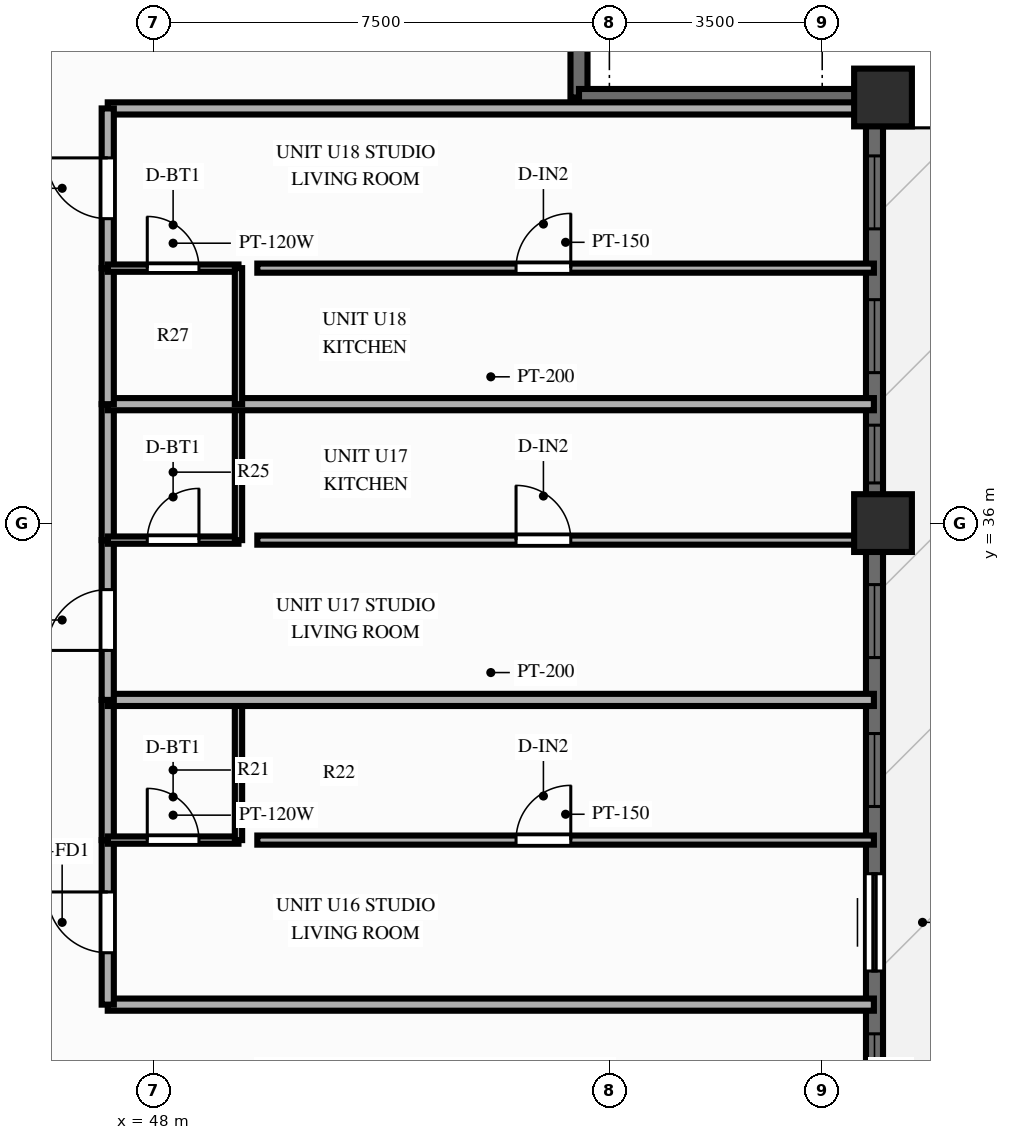
"""IFC4 building model, lengths in metres.
Left out: names, types, materials, properties, quantities, classifications, styles, units other than length and angle.
Written with IfcOpenShell. Run it as: python <this file> out.ifc"""

import sys

from ifc_helpers import new_model, si_unit, direction, frame, frame_2d, origin, origin_2d, place, context, subcontext, project, spatial, rectangle, extrude, source, transform, mapped, element, fill, save


model = new_model("IFC4")
c1 = context("Model", 3, precision=1e-05, world=origin(), true_north=direction((0.0, 1.0)))
c2 = subcontext(c1, "Body", "Model", "MODEL_VIEW")
j1 = project(units=[si_unit("LENGTHUNIT", "METRE"), si_unit("PLANEANGLEUNIT", "RADIAN")], contexts=[c1])
p1 = place(None, origin())
s1 = spatial("IfcSite", under=j1, at=p1, CompositionType="ELEMENT")
p2 = place(p1, origin())
s2 = spatial("IfcBuilding", under=s1, at=p2, CompositionType="ELEMENT")
p3 = place(p2, frame((0.0, 0.0, 163.0)))
s3 = spatial("IfcBuildingStorey", under=s2, at=p3, CompositionType="ELEMENT", Elevation=163.0)
m1 = source(origin(), c2, "Body", "SweptSolid", [
    extrude(rectangle(XDim=0.95, YDim=0.95, at=origin_2d()), origin(), (0.0, 0.0, 1.0), 3.0),
])
for number, where, z_axis, x_axis in (
    (1, (60.0, 36.0, 0.0), (0.0, 0.0, 1.0), (1.0, 0.0, 0.0)),
    (2, (60.0, 43.0, 0.0), (0.0, 0.0, 1.0), (1.0, 0.0, 0.0)),
):
    element("IfcColumn", number, at=place(p3, frame(where, z_axis=z_axis, x_axis=x_axis)), inside=s3, PredefinedType="COLUMN", context=c2, shape_type="MappedRepresentation", body=[
        mapped(m1, transform((0.0, 0.0, 0.0), scale=1.0)),
    ])
p4 = place(p3, frame((59.86, 11.0, 0.0), z_axis=(0.0, 0.0, 1.0), x_axis=(0.0, 1.0, 0.0)))
e3 = element("IfcWall", 3, at=p4, inside=s3, PredefinedType="SOLIDWALL", context=c2, shape_type="SweptSolid", body=[
    extrude(rectangle(XDim=32.0, YDim=0.28, at=frame_2d((16.0, 0.0))), origin(), (0.0, 0.0, 1.0), 2.28),
])
p5 = place(p4, frame((1.04, 0.0, 0.25)))
e4 = element("IfcOpeningElement", 4, at=p5, cuts=e3, PredefinedType="OPENING", context=c2, shape_type="SweptSolid", body=[
    extrude(rectangle(XDim=1.2, YDim=1.5, at=frame_2d((0.6, 0.75))), frame((0.0, 0.152, 0.0), z_axis=(0.0, -1.0, 0.0), x_axis=(1.0, 0.0, 0.0)), (0.0, 0.0, 1.0), 0.304),
])
p6 = place(p4, frame((3.552, 0.0, 0.25)))
e5 = element("IfcOpeningElement", 5, at=p6, cuts=e3, PredefinedType="OPENING", context=c2, shape_type="SweptSolid", body=[
    extrude(rectangle(XDim=1.2, YDim=1.5, at=frame_2d((0.6, 0.75))), frame((0.0, 0.152, 0.0), z_axis=(0.0, -1.0, 0.0), x_axis=(1.0, 0.0, 0.0)), (0.0, 0.0, 1.0), 0.304),
])
p7 = place(p4, frame((5.662, 0.0, 0.25)))
e6 = element("IfcOpeningElement", 6, at=p7, cuts=e3, PredefinedType="OPENING", context=c2, shape_type="SweptSolid", body=[
    extrude(rectangle(XDim=0.7, YDim=1.5, at=frame_2d((0.35, 0.75))), frame((0.0, 0.152, 0.0), z_axis=(0.0, -1.0, 0.0), x_axis=(1.0, 0.0, 0.0)), (0.0, 0.0, 1.0), 0.304),
])
p8 = place(p4, frame((8.29, 0.0, 0.25)))
e7 = element("IfcOpeningElement", 7, at=p8, cuts=e3, PredefinedType="OPENING", context=c2, shape_type="SweptSolid", body=[
    extrude(rectangle(XDim=1.2, YDim=1.5, at=frame_2d((0.6, 0.75))), frame((0.0, 0.152, 0.0), z_axis=(0.0, -1.0, 0.0), x_axis=(1.0, 0.0, 0.0)), (0.0, 0.0, 1.0), 0.304),
])
p9 = place(p4, frame((10.688, 0.0, 0.25)))
e8 = element("IfcOpeningElement", 8, at=p9, cuts=e3, PredefinedType="OPENING", context=c2, shape_type="SweptSolid", body=[
    extrude(rectangle(XDim=1.2, YDim=1.5, at=frame_2d((0.6, 0.75))), frame((0.0, 0.152, 0.0), z_axis=(0.0, -1.0, 0.0), x_axis=(1.0, 0.0, 0.0)), (0.0, 0.0, 1.0), 0.304),
])
p10 = place(p4, frame((13.046, 0.0, 0.25)))
e9 = element("IfcOpeningElement", 9, at=p10, cuts=e3, PredefinedType="OPENING", context=c2, shape_type="SweptSolid", body=[
    extrude(rectangle(XDim=1.2, YDim=1.5, at=frame_2d((0.6, 0.75))), frame((0.0, 0.152, 0.0), z_axis=(0.0, -1.0, 0.0), x_axis=(1.0, 0.0, 0.0)), (0.0, 0.0, 1.0), 0.304),
])
p11 = place(p4, frame((15.4, 0.0, 0.25)))
e10 = element("IfcOpeningElement", 10, at=p11, cuts=e3, PredefinedType="OPENING", context=c2, shape_type="SweptSolid", body=[
    extrude(rectangle(XDim=1.2, YDim=1.5, at=frame_2d((0.6, 0.75))), frame((0.0, 0.152, 0.0), z_axis=(0.0, -1.0, 0.0), x_axis=(1.0, 0.0, 0.0)), (0.0, 0.0, 1.0), 0.304),
])
p12 = place(p4, frame((19.233, 0.0, 0.0), z_axis=(0.0, 0.0, 1.0), x_axis=(-1.0, 0.0, 0.0)))
e11 = element("IfcOpeningElement", 11, at=p12, cuts=e3, PredefinedType="OPENING", context=c2, shape_type="SweptSolid", body=[
    extrude(rectangle(XDim=1.6, YDim=2.15, at=frame_2d((0.8, 1.075))), frame((0.0, 0.152, 0.0), z_axis=(0.0, -1.0, 0.0), x_axis=(1.0, 0.0, 0.0)), (0.0, 0.0, 1.0), 0.304),
])
p13 = place(p4, frame((20.339, 0.0, 0.25)))
e12 = element("IfcOpeningElement", 12, at=p13, cuts=e3, PredefinedType="OPENING", context=c2, shape_type="SweptSolid", body=[
    extrude(rectangle(XDim=1.2, YDim=1.5, at=frame_2d((0.6, 0.75))), frame((0.0, 0.152, 0.0), z_axis=(0.0, -1.0, 0.0), x_axis=(1.0, 0.0, 0.0)), (0.0, 0.0, 1.0), 0.304),
])
p14 = place(p4, frame((22.788, 0.0, 0.25)))
e13 = element("IfcOpeningElement", 13, at=p14, cuts=e3, PredefinedType="OPENING", context=c2, shape_type="SweptSolid", body=[
    extrude(rectangle(XDim=1.2, YDim=1.5, at=frame_2d((0.6, 0.75))), frame((0.0, 0.152, 0.0), z_axis=(0.0, -1.0, 0.0), x_axis=(1.0, 0.0, 0.0)), (0.0, 0.0, 1.0), 0.304),
])
p15 = place(p4, frame((25.66, 0.0, 0.25)))
e14 = element("IfcOpeningElement", 14, at=p15, cuts=e3, PredefinedType="OPENING", context=c2, shape_type="SweptSolid", body=[
    extrude(rectangle(XDim=0.95, YDim=1.5, at=frame_2d((0.475, 0.75))), frame((0.0, 0.152, 0.0), z_axis=(0.0, -1.0, 0.0), x_axis=(1.0, 0.0, 0.0)), (0.0, 0.0, 1.0), 0.304),
])
p16 = place(p4, frame((27.475, 0.0, 0.25)))
e15 = element("IfcOpeningElement", 15, at=p16, cuts=e3, PredefinedType="OPENING", context=c2, shape_type="SweptSolid", body=[
    extrude(rectangle(XDim=1.2, YDim=1.5, at=frame_2d((0.6, 0.75))), frame((0.0, 0.152, 0.0), z_axis=(0.0, -1.0, 0.0), x_axis=(1.0, 0.0, 0.0)), (0.0, 0.0, 1.0), 0.304),
])
p17 = place(p4, frame((29.839, 0.0, 0.25)))
e16 = element("IfcOpeningElement", 16, at=p17, cuts=e3, PredefinedType="OPENING", context=c2, shape_type="SweptSolid", body=[
    extrude(rectangle(XDim=1.2, YDim=1.5, at=frame_2d((0.6, 0.75))), frame((0.0, 0.152, 0.0), z_axis=(0.0, -1.0, 0.0), x_axis=(1.0, 0.0, 0.0)), (0.0, 0.0, 1.0), 0.304),
])
for number, where, z_axis, x_axis in (
    (17, (55.0, 43.0, 0.0), (0.0, 0.0, 1.0), (0.0, 1.0, 0.0)),
    (18, (55.0, 43.0, 0.0), (0.0, 0.0, 1.0), (1.0, 0.0, 0.0)),
):
    element("IfcWall", number, at=place(p3, frame(where, z_axis=z_axis, x_axis=x_axis)), inside=s3, PredefinedType="SOLIDWALL", context=c2, shape_type="SweptSolid", body=[
        extrude(rectangle(XDim=4.92, YDim=0.28, at=frame_2d((2.46, 0.0))), origin(), (0.0, 0.0, 1.0), 2.28),
    ])
for number, where, z_axis, x_axis in (
    (19, (47.25, 28.08, 0.0), (0.0, 0.0, 1.0), (1.0, 0.0, 0.0)),
    (20, (47.25, 42.82, 0.0), (0.0, 0.0, 1.0), (1.0, 0.0, 0.0)),
):
    element("IfcWall", number, at=place(p3, frame(where, z_axis=z_axis, x_axis=x_axis)), inside=s3, PredefinedType="PARTITIONING", context=c2, shape_type="SweptSolid", body=[
        extrude(rectangle(XDim=12.6, YDim=0.2, at=frame_2d((6.3, 0.0))), origin(), (0.0, 0.0, 1.0), 2.79),
    ])
p18 = place(p3, frame((47.25, 28.08, 0.0), z_axis=(0.0, 0.0, 1.0), x_axis=(0.0, 1.0, 0.0)))
e21 = element("IfcWall", 21, at=p18, inside=s3, PredefinedType="PARTITIONING", context=c2, shape_type="SweptSolid", body=[
    extrude(rectangle(XDim=2.706, YDim=0.2, at=frame_2d((1.353, 0.0))), origin(), (0.0, 0.0, 1.0), 2.79),
])
p19 = place(p18, frame((0.853, 0.0, 0.0)))
e22 = element("IfcOpeningElement", 22, at=p19, cuts=e21, PredefinedType="OPENING", context=c2, shape_type="SweptSolid", body=[
    extrude(rectangle(XDim=1.0, YDim=2.15, at=frame_2d((0.5, 1.075))), frame((0.0, 0.112, 0.0), z_axis=(0.0, -1.0, 0.0), x_axis=(1.0, 0.0, 0.0)), (0.0, 0.0, 1.0), 0.224),
])
p20 = place(p3, frame((47.25, 30.786, 0.0), z_axis=(0.0, 0.0, 1.0), x_axis=(0.0, 1.0, 0.0)))
e23 = element("IfcWall", 23, at=p20, inside=s3, PredefinedType="PARTITIONING", context=c2, shape_type="SweptSolid", body=[
    extrude(rectangle(XDim=2.305, YDim=0.2, at=frame_2d((1.153, 0.0))), origin(), (0.0, 0.0, 1.0), 2.79),
])
p21 = place(p3, frame((47.25, 30.786, 0.0), z_axis=(0.0, 0.0, 1.0), x_axis=(1.0, 0.0, 0.0)))
e24 = element("IfcWall", 24, at=p21, inside=s3, PredefinedType="PARTITIONING", context=c2, shape_type="SweptSolid", body=[
    extrude(rectangle(XDim=2.15, YDim=0.12, at=frame_2d((1.075, 0.0))), origin(), (0.0, 0.0, 1.0), 2.79),
])
p22 = place(p21, frame((0.65, 0.0, 0.0)))
e25 = element("IfcOpeningElement", 25, at=p22, cuts=e24, PredefinedType="OPENING", context=c2, shape_type="SweptSolid", body=[
    extrude(rectangle(XDim=0.85, YDim=2.05, at=frame_2d((0.425, 1.025))), frame((0.0, 0.072, 0.0), z_axis=(0.0, -1.0, 0.0), x_axis=(1.0, 0.0, 0.0)), (0.0, 0.0, 1.0), 0.144),
])
p23 = place(p3, frame((49.4, 30.786, 0.0), z_axis=(0.0, 0.0, 1.0), x_axis=(0.0, 1.0, 0.0)))
e26 = element("IfcWall", 26, at=p23, inside=s3, PredefinedType="PARTITIONING", context=c2, shape_type="SweptSolid", body=[
    extrude(rectangle(XDim=2.305, YDim=0.12, at=frame_2d((1.153, 0.0))), origin(), (0.0, 0.0, 1.0), 2.79),
])
p24 = place(p3, frame((49.71, 30.786, 0.0), z_axis=(0.0, 0.0, 1.0), x_axis=(1.0, 0.0, 0.0)))
e27 = element("IfcWall", 27, at=p24, inside=s3, PredefinedType="PARTITIONING", context=c2, shape_type="SweptSolid", body=[
    extrude(rectangle(XDim=10.14, YDim=0.15, at=frame_2d((5.07, 0.0))), origin(), (0.0, 0.0, 1.0), 2.79),
])
p25 = place(p24, frame((4.255, 0.0, 0.0)))
e28 = element("IfcOpeningElement", 28, at=p25, cuts=e27, PredefinedType="OPENING", context=c2, shape_type="SweptSolid", body=[
    extrude(rectangle(XDim=0.9, YDim=2.1, at=frame_2d((0.45, 1.05))), frame((0.0, 0.087, 0.0), z_axis=(0.0, -1.0, 0.0), x_axis=(1.0, 0.0, 0.0)), (0.0, 0.0, 1.0), 0.174),
])
p26 = place(p3, frame((47.25, 33.092, 0.0), z_axis=(0.0, 0.0, 1.0), x_axis=(1.0, 0.0, 0.0)))
e29 = element("IfcWall", 29, at=p26, inside=s3, PredefinedType="PARTITIONING", context=c2, shape_type="SweptSolid", body=[
    extrude(rectangle(XDim=12.6, YDim=0.2, at=frame_2d((6.3, 0.0))), origin(), (0.0, 0.0, 1.0), 2.79),
])
p27 = place(p3, frame((47.25, 33.092, 0.0), z_axis=(0.0, 0.0, 1.0), x_axis=(0.0, 1.0, 0.0)))
e30 = element("IfcWall", 30, at=p27, inside=s3, PredefinedType="PARTITIONING", context=c2, shape_type="SweptSolid", body=[
    extrude(rectangle(XDim=2.628, YDim=0.2, at=frame_2d((1.314, 0.0))), origin(), (0.0, 0.0, 1.0), 2.79),
])
p28 = place(p27, frame((0.814, 0.0, 0.0)))
e31 = element("IfcOpeningElement", 31, at=p28, cuts=e30, PredefinedType="OPENING", context=c2, shape_type="SweptSolid", body=[
    extrude(rectangle(XDim=1.0, YDim=2.15, at=frame_2d((0.5, 1.075))), frame((0.0, 0.112, 0.0), z_axis=(0.0, -1.0, 0.0), x_axis=(1.0, 0.0, 0.0)), (0.0, 0.0, 1.0), 0.224),
])
p29 = place(p3, frame((47.25, 35.72, 0.0), z_axis=(0.0, 0.0, 1.0), x_axis=(0.0, 1.0, 0.0)))
e32 = element("IfcWall", 32, at=p29, inside=s3, PredefinedType="PARTITIONING", context=c2, shape_type="SweptSolid", body=[
    extrude(rectangle(XDim=2.236, YDim=0.2, at=frame_2d((1.118, 0.0))), origin(), (0.0, 0.0, 1.0), 2.79),
])
p30 = place(p3, frame((47.25, 35.72, 0.0), z_axis=(0.0, 0.0, 1.0), x_axis=(1.0, 0.0, 0.0)))
e33 = element("IfcWall", 33, at=p30, inside=s3, PredefinedType="PARTITIONING", context=c2, shape_type="SweptSolid", body=[
    extrude(rectangle(XDim=2.15, YDim=0.12, at=frame_2d((1.075, 0.0))), origin(), (0.0, 0.0, 1.0), 2.79),
])
p31 = place(p30, frame((0.65, 0.0, 0.0)))
e34 = element("IfcOpeningElement", 34, at=p31, cuts=e33, PredefinedType="OPENING", context=c2, shape_type="SweptSolid", body=[
    extrude(rectangle(XDim=0.85, YDim=2.05, at=frame_2d((0.425, 1.025))), frame((0.0, 0.072, 0.0), z_axis=(0.0, -1.0, 0.0), x_axis=(1.0, 0.0, 0.0)), (0.0, 0.0, 1.0), 0.144),
])
p32 = place(p3, frame((49.4, 35.72, 0.0), z_axis=(0.0, 0.0, 1.0), x_axis=(0.0, 1.0, 0.0)))
e35 = element("IfcWall", 35, at=p32, inside=s3, PredefinedType="PARTITIONING", context=c2, shape_type="SweptSolid", body=[
    extrude(rectangle(XDim=2.236, YDim=0.12, at=frame_2d((1.118, 0.0))), origin(), (0.0, 0.0, 1.0), 2.79),
])
p33 = place(p3, frame((49.71, 35.72, 0.0), z_axis=(0.0, 0.0, 1.0), x_axis=(1.0, 0.0, 0.0)))
e36 = element("IfcWall", 36, at=p33, inside=s3, PredefinedType="PARTITIONING", context=c2, shape_type="SweptSolid", body=[
    extrude(rectangle(XDim=10.14, YDim=0.15, at=frame_2d((5.07, 0.0))), origin(), (0.0, 0.0, 1.0), 2.79),
])
p34 = place(p33, frame((4.255, 0.0, 0.0)))
e37 = element("IfcOpeningElement", 37, at=p34, cuts=e36, PredefinedType="OPENING", context=c2, shape_type="SweptSolid", body=[
    extrude(rectangle(XDim=0.9, YDim=2.1, at=frame_2d((0.45, 1.05))), frame((0.0, 0.087, 0.0), z_axis=(0.0, -1.0, 0.0), x_axis=(1.0, 0.0, 0.0)), (0.0, 0.0, 1.0), 0.174),
])
p35 = place(p3, frame((47.25, 37.956, 0.0), z_axis=(0.0, 0.0, 1.0), x_axis=(1.0, 0.0, 0.0)))
e38 = element("IfcWall", 38, at=p35, inside=s3, PredefinedType="PARTITIONING", context=c2, shape_type="SweptSolid", body=[
    extrude(rectangle(XDim=12.6, YDim=0.2, at=frame_2d((6.3, 0.0))), origin(), (0.0, 0.0, 1.0), 2.79),
])
p36 = place(p3, frame((47.25, 37.956, 0.0), z_axis=(0.0, 0.0, 1.0), x_axis=(0.0, 1.0, 0.0)))
e39 = element("IfcWall", 39, at=p36, inside=s3, PredefinedType="PARTITIONING", context=c2, shape_type="SweptSolid", body=[
    extrude(rectangle(XDim=2.238, YDim=0.2, at=frame_2d((1.119, 0.0))), origin(), (0.0, 0.0, 1.0), 2.79),
])
p37 = place(p3, frame((47.25, 40.193, 0.0), z_axis=(0.0, 0.0, 1.0), x_axis=(0.0, 1.0, 0.0)))
e40 = element("IfcWall", 40, at=p37, inside=s3, PredefinedType="PARTITIONING", context=c2, shape_type="SweptSolid", body=[
    extrude(rectangle(XDim=2.627, YDim=0.2, at=frame_2d((1.313, 0.0))), origin(), (0.0, 0.0, 1.0), 2.79),
])
p38 = place(p37, frame((0.813, 0.0, 0.0)))
e41 = element("IfcOpeningElement", 41, at=p38, cuts=e40, PredefinedType="OPENING", context=c2, shape_type="SweptSolid", body=[
    extrude(rectangle(XDim=1.0, YDim=2.15, at=frame_2d((0.5, 1.075))), frame((0.0, 0.112, 0.0), z_axis=(0.0, -1.0, 0.0), x_axis=(1.0, 0.0, 0.0)), (0.0, 0.0, 1.0), 0.224),
])
p39 = place(p3, frame((47.25, 40.193, 0.0), z_axis=(0.0, 0.0, 1.0), x_axis=(1.0, 0.0, 0.0)))
e42 = element("IfcWall", 42, at=p39, inside=s3, PredefinedType="PARTITIONING", context=c2, shape_type="SweptSolid", body=[
    extrude(rectangle(XDim=2.15, YDim=0.12, at=frame_2d((1.075, 0.0))), origin(), (0.0, 0.0, 1.0), 2.79),
])
p40 = place(p39, frame((0.65, 0.0, 0.0)))
e43 = element("IfcOpeningElement", 43, at=p40, cuts=e42, PredefinedType="OPENING", context=c2, shape_type="SweptSolid", body=[
    extrude(rectangle(XDim=0.85, YDim=2.05, at=frame_2d((0.425, 1.025))), frame((0.0, 0.072, 0.0), z_axis=(0.0, -1.0, 0.0), x_axis=(1.0, 0.0, 0.0)), (0.0, 0.0, 1.0), 0.144),
])
p41 = place(p3, frame((49.4, 37.956, 0.0), z_axis=(0.0, 0.0, 1.0), x_axis=(0.0, 1.0, 0.0)))
e44 = element("IfcWall", 44, at=p41, inside=s3, PredefinedType="PARTITIONING", context=c2, shape_type="SweptSolid", body=[
    extrude(rectangle(XDim=2.238, YDim=0.12, at=frame_2d((1.119, 0.0))), origin(), (0.0, 0.0, 1.0), 2.79),
])
p42 = place(p3, frame((49.71, 40.193, 0.0), z_axis=(0.0, 0.0, 1.0), x_axis=(1.0, 0.0, 0.0)))
e45 = element("IfcWall", 45, at=p42, inside=s3, PredefinedType="PARTITIONING", context=c2, shape_type="SweptSolid", body=[
    extrude(rectangle(XDim=10.14, YDim=0.15, at=frame_2d((5.07, 0.0))), origin(), (0.0, 0.0, 1.0), 2.79),
])
p43 = place(p42, frame((4.255, 0.0, 0.0)))
e46 = element("IfcOpeningElement", 46, at=p43, cuts=e45, PredefinedType="OPENING", context=c2, shape_type="SweptSolid", body=[
    extrude(rectangle(XDim=0.9, YDim=2.1, at=frame_2d((0.45, 1.05))), frame((0.0, 0.087, 0.0), z_axis=(0.0, -1.0, 0.0), x_axis=(1.0, 0.0, 0.0)), (0.0, 0.0, 1.0), 0.174),
])
m2 = source(origin(), c2, "Body", "SweptSolid", [
    extrude(rectangle(XDim=1.2, YDim=1.5, at=frame_2d((0.6, 0.75))), frame((0.0, 0.03, 0.0), z_axis=(0.0, -1.0, 0.0), x_axis=(1.0, 0.0, 0.0)), (0.0, 0.0, 1.0), 0.06),
])
p44 = place(p11, origin())
e47 = element("IfcWindow", 47, at=p44, inside=s3, PartitioningType="SINGLE_PANEL", PredefinedType="WINDOW", context=c2, shape_type="MappedRepresentation", body=[
    mapped(m2, transform((0.0, 0.0, 0.0), scale=1.0)),
])
fill(e10, e47)
m3 = source(origin(), c2, "Body", "SweptSolid", [
    extrude(rectangle(XDim=1.6, YDim=2.15, at=frame_2d((0.8, 1.075))), frame((0.0, 0.025, 0.0), z_axis=(0.0, -1.0, 0.0), x_axis=(1.0, 0.0, 0.0)), (0.0, 0.0, 1.0), 0.05),
])
p45 = place(p12, origin())
e48 = element("IfcDoor", 48, at=p45, inside=s3, OperationType="SLIDING_TO_LEFT", PredefinedType="DOOR", context=c2, shape_type="MappedRepresentation", body=[
    mapped(m3, transform((0.0, 0.0, 0.0), scale=1.0)),
])
fill(e11, e48)
p46 = place(p13, origin())
e49 = element("IfcWindow", 49, at=p46, inside=s3, PartitioningType="SINGLE_PANEL", PredefinedType="WINDOW", context=c2, shape_type="MappedRepresentation", body=[
    mapped(m2, transform((0.0, 0.0, 0.0), scale=1.0)),
])
fill(e12, e49)
p47 = place(p14, origin())
e50 = element("IfcWindow", 50, at=p47, inside=s3, PartitioningType="SINGLE_PANEL", PredefinedType="WINDOW", context=c2, shape_type="MappedRepresentation", body=[
    mapped(m2, transform((0.0, 0.0, 0.0), scale=1.0)),
])
fill(e13, e50)
m4 = source(origin(), c2, "Body", "SweptSolid", [
    extrude(rectangle(XDim=0.95, YDim=1.5, at=frame_2d((0.475, 0.75))), frame((0.0, 0.03, 0.0), z_axis=(0.0, -1.0, 0.0), x_axis=(1.0, 0.0, 0.0)), (0.0, 0.0, 1.0), 0.06),
])
p48 = place(p15, origin())
e51 = element("IfcWindow", 51, at=p48, inside=s3, PartitioningType="SINGLE_PANEL", PredefinedType="WINDOW", context=c2, shape_type="MappedRepresentation", body=[
    mapped(m4, transform((0.0, 0.0, 0.0), scale=1.0)),
])
fill(e14, e51)
p49 = place(p16, origin())
e52 = element("IfcWindow", 52, at=p49, inside=s3, PartitioningType="SINGLE_PANEL", PredefinedType="WINDOW", context=c2, shape_type="MappedRepresentation", body=[
    mapped(m2, transform((0.0, 0.0, 0.0), scale=1.0)),
])
fill(e15, e52)
p50 = place(p17, origin())
e53 = element("IfcWindow", 53, at=p50, inside=s3, PartitioningType="SINGLE_PANEL", PredefinedType="WINDOW", context=c2, shape_type="MappedRepresentation", body=[
    mapped(m2, transform((0.0, 0.0, 0.0), scale=1.0)),
])
fill(e16, e53)
m5 = source(origin(), c2, "Body", "SweptSolid", [
    extrude(rectangle(XDim=1.0, YDim=2.15, at=frame_2d((0.5, 1.075))), frame((0.0, 0.025, 0.0), z_axis=(0.0, -1.0, 0.0), x_axis=(1.0, 0.0, 0.0)), (0.0, 0.0, 1.0), 0.05),
])
p51 = place(p19, origin())
e54 = element("IfcDoor", 54, at=p51, inside=s3, OperationType="SINGLE_SWING_RIGHT", PredefinedType="DOOR", context=c2, shape_type="MappedRepresentation", body=[
    mapped(m5, transform((0.0, 0.0, 0.0), scale=1.0)),
])
fill(e22, e54)
m6 = source(origin(), c2, "Body", "SweptSolid", [
    extrude(rectangle(XDim=0.85, YDim=2.05, at=frame_2d((0.425, 1.025))), frame((0.0, 0.025, 0.0), z_axis=(0.0, -1.0, 0.0), x_axis=(1.0, 0.0, 0.0)), (0.0, 0.0, 1.0), 0.05),
])
p52 = place(p22, origin())
e55 = element("IfcDoor", 55, at=p52, inside=s3, OperationType="SINGLE_SWING_LEFT", PredefinedType="DOOR", context=c2, shape_type="MappedRepresentation", body=[
    mapped(m6, transform((0.0, 0.0, 0.0), scale=1.0)),
])
fill(e25, e55)
m7 = source(origin(), c2, "Body", "SweptSolid", [
    extrude(rectangle(XDim=0.9, YDim=2.1, at=frame_2d((0.45, 1.05))), frame((0.0, 0.025, 0.0), z_axis=(0.0, -1.0, 0.0), x_axis=(1.0, 0.0, 0.0)), (0.0, 0.0, 1.0), 0.05),
])
p53 = place(p25, origin())
e56 = element("IfcDoor", 56, at=p53, inside=s3, OperationType="SINGLE_SWING_RIGHT", PredefinedType="DOOR", context=c2, shape_type="MappedRepresentation", body=[
    mapped(m7, transform((0.0, 0.0, 0.0), scale=1.0)),
])
fill(e28, e56)
p54 = place(p28, origin())
e57 = element("IfcDoor", 57, at=p54, inside=s3, OperationType="SINGLE_SWING_LEFT", PredefinedType="DOOR", context=c2, shape_type="MappedRepresentation", body=[
    mapped(m5, transform((0.0, 0.0, 0.0), scale=1.0)),
])
fill(e31, e57)
p55 = place(p31, origin())
e58 = element("IfcDoor", 58, at=p55, inside=s3, OperationType="SINGLE_SWING_RIGHT", PredefinedType="DOOR", context=c2, shape_type="MappedRepresentation", body=[
    mapped(m6, transform((0.0, 0.0, 0.0), scale=1.0)),
])
fill(e34, e58)
p56 = place(p34, origin())
e59 = element("IfcDoor", 59, at=p56, inside=s3, OperationType="SINGLE_SWING_LEFT", PredefinedType="DOOR", context=c2, shape_type="MappedRepresentation", body=[
    mapped(m7, transform((0.0, 0.0, 0.0), scale=1.0)),
])
fill(e37, e59)
p57 = place(p38, origin())
e60 = element("IfcDoor", 60, at=p57, inside=s3, OperationType="SINGLE_SWING_RIGHT", PredefinedType="DOOR", context=c2, shape_type="MappedRepresentation", body=[
    mapped(m5, transform((0.0, 0.0, 0.0), scale=1.0)),
])
fill(e41, e60)
p58 = place(p40, origin())
e61 = element("IfcDoor", 61, at=p58, inside=s3, OperationType="SINGLE_SWING_LEFT", PredefinedType="DOOR", context=c2, shape_type="MappedRepresentation", body=[
    mapped(m6, transform((0.0, 0.0, 0.0), scale=1.0)),
])
fill(e43, e61)
p59 = place(p43, origin())
e62 = element("IfcDoor", 62, at=p59, inside=s3, OperationType="SINGLE_SWING_RIGHT", PredefinedType="DOOR", context=c2, shape_type="MappedRepresentation", body=[
    mapped(m7, transform((0.0, 0.0, 0.0), scale=1.0)),
])
fill(e46, e62)
save(model, sys.argv[1])
